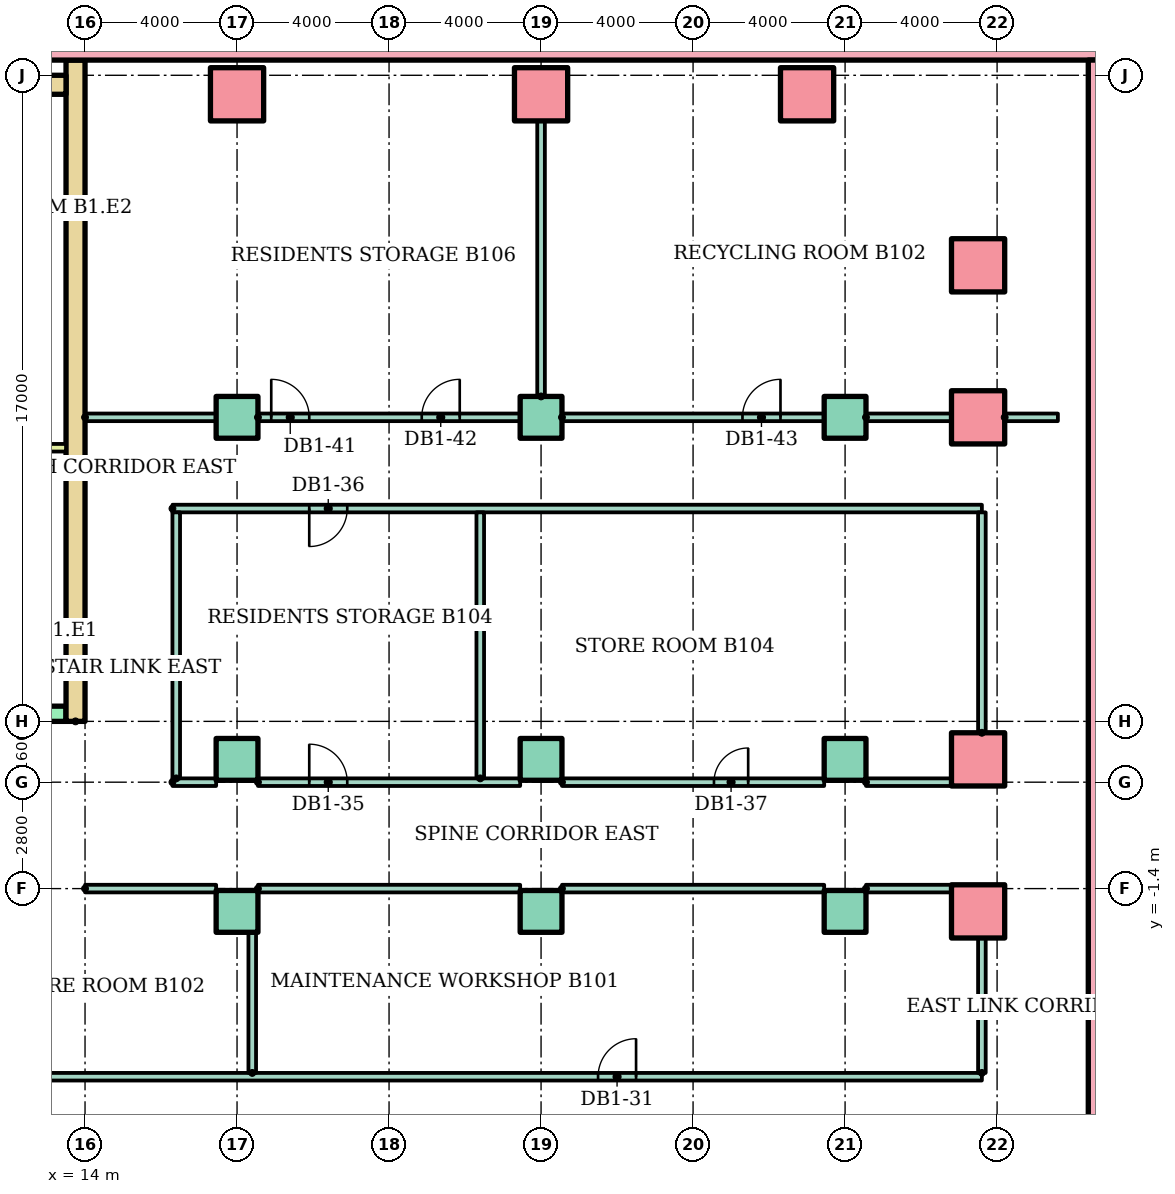
"""IFC4 building model, lengths in metres.
Left out: names, types, materials, properties, quantities, classifications, styles, units other than length and angle.
Written with IfcOpenShell. Run it as: python <this file> out.ifc"""

import sys

from ifc_helpers import new_model, si_unit, direction, frame, frame_2d, origin, origin_2d, place, context, subcontext, project, spatial, rectangle, hollow_rectangle, extrude, element, fill, save


model = new_model("IFC4")
c1 = context("Model", 3, precision=1e-05, world=origin(), true_north=direction((0.0, 1.0)))
c2 = subcontext(c1, "Body", "Model", "MODEL_VIEW")
j1 = project(units=[si_unit("LENGTHUNIT", "METRE"), si_unit("PLANEANGLEUNIT", "RADIAN")], contexts=[c1])
p1 = place(None, origin())
s1 = spatial("IfcSite", under=j1, at=p1, CompositionType="ELEMENT")
p2 = place(p1, origin())
s2 = spatial("IfcBuilding", under=s1, at=p2, CompositionType="ELEMENT")
p3 = place(p2, frame((0.0, 0.0, -5.0)))
s3 = spatial("IfcBuildingStorey", under=s2, at=p3, CompositionType="ELEMENT", Elevation=-5.0)
p4 = place(p3, frame((-41.0, 20.7, -0.35)))
e1 = element("IfcWall", 1, at=p4, inside=s3, PredefinedType="SOLIDWALL", context=c2, shape_type="SweptSolid", body=[
    extrude(rectangle(XDim=82.0, YDim=0.6, at=frame_2d((41.0, 0.0))), origin(), (0.0, 0.0, 1.0), 4.93),
])
p5 = place(p3, frame((40.7, -50.4, -0.35), z_axis=(0.0, 0.0, 1.0), x_axis=(0.0, 1.0, 0.0)))
e2 = element("IfcWall", 2, at=p5, inside=s3, PredefinedType="SOLIDWALL", context=c2, shape_type="SweptSolid", body=[
    extrude(rectangle(XDim=70.8, YDim=0.6, at=frame_2d((35.4, 0.0))), origin(), (0.0, 0.0, 1.0), 4.93),
])
for number, where in (
    (3, (18.0, -2.0, 0.0)),
    (4, (26.0, -2.0, 0.0)),
    (5, (34.0, -2.0, 0.0)),
):
    element("IfcColumn", number, at=place(p3, frame(where)), inside=s3, PredefinedType="COLUMN", context=c2, shape_type="SweptSolid", body=[
        extrude(rectangle(XDim=1.1, YDim=1.1, at=origin_2d()), origin(), (0.0, 0.0, 1.0), 5.0),
    ])
p6 = place(p3, frame((37.5, -2.0, 0.0)))
e6 = element("IfcColumn", 6, at=p6, inside=s3, PredefinedType="COLUMN", context=c2, shape_type="SweptSolid", body=[
    extrude(hollow_rectangle(XDim=1.4, YDim=1.4, WallThickness=0.08, at=origin_2d()), origin(), (0.0, 0.0, 1.0), 5.0),
])
for number, where in (
    (7, (18.0, 2.0, 0.0)),
    (8, (26.0, 2.0, 0.0)),
    (9, (34.0, 2.0, 0.0)),
):
    element("IfcColumn", number, at=place(p3, frame(where)), inside=s3, PredefinedType="COLUMN", context=c2, shape_type="SweptSolid", body=[
        extrude(rectangle(XDim=1.1, YDim=1.1, at=origin_2d()), origin(), (0.0, 0.0, 1.0), 5.0),
    ])
p7 = place(p3, frame((37.5, 2.0, 0.0)))
e10 = element("IfcColumn", 10, at=p7, inside=s3, PredefinedType="COLUMN", context=c2, shape_type="SweptSolid", body=[
    extrude(hollow_rectangle(XDim=1.4, YDim=1.4, WallThickness=0.08, at=origin_2d()), origin(), (0.0, 0.0, 1.0), 5.0),
])
for number, where in (
    (11, (18.0, 11.0, 0.0)),
    (12, (26.0, 11.0, 0.0)),
    (13, (34.0, 11.0, 0.0)),
):
    element("IfcColumn", number, at=place(p3, frame(where)), inside=s3, PredefinedType="COLUMN", context=c2, shape_type="SweptSolid", body=[
        extrude(rectangle(XDim=1.1, YDim=1.1, at=origin_2d()), origin(), (0.0, 0.0, 1.0), 5.0),
    ])
for number, where in (
    (14, (37.5, 11.0, 0.0)),
    (15, (37.5, 15.0, 0.0)),
    (16, (18.0, 19.5, 0.0)),
    (17, (26.0, 19.5, 0.0)),
    (18, (33.0, 19.5, 0.0)),
):
    element("IfcColumn", number, at=place(p3, frame(where)), inside=s3, PredefinedType="COLUMN", context=c2, shape_type="SweptSolid", body=[
        extrude(hollow_rectangle(XDim=1.4, YDim=1.4, WallThickness=0.08, at=origin_2d()), origin(), (0.0, 0.0, 1.0), 5.0),
    ])
p8 = place(p3, frame((13.75, 3.0, 0.0), z_axis=(0.0, 0.0, 1.0), x_axis=(0.0, 1.0, 0.0)))
e19 = element("IfcWall", 19, at=p8, inside=s3, PredefinedType="SHEAR", context=c2, shape_type="SweptSolid", body=[
    extrude(rectangle(XDim=17.4, YDim=0.5, at=frame_2d((8.7, 0.0))), origin(), (0.0, 0.0, 1.0), 4.58),
])
p9 = place(p3, frame((-13.5, 19.75, 0.0)))
e20 = element("IfcWall", 20, at=p9, inside=s3, PredefinedType="SHEAR", context=c2, shape_type="SweptSolid", body=[
    extrude(rectangle(XDim=27.0, YDim=0.5, at=frame_2d((13.5, 0.0))), origin(), (0.0, 0.0, 1.0), 4.58),
])
p10 = place(p3, frame((-13.5, 3.2, 0.0)))
e21 = element("IfcWall", 21, at=p10, inside=s3, PredefinedType="SHEAR", context=c2, shape_type="SweptSolid", body=[
    extrude(rectangle(XDim=27.0, YDim=0.4, at=frame_2d((13.5, 0.0))), origin(), (0.0, 0.0, 1.0), 4.58),
])
p11 = place(p10, frame((6.861, 0.0, 0.0)))
e22 = element("IfcOpeningElement", 22, at=p11, cuts=e21, PredefinedType="OPENING", context=c2, shape_type="SweptSolid", body=[
    extrude(rectangle(XDim=1.1, YDim=2.1, at=frame_2d((0.55, 1.05))), frame((0.0, 0.21, 0.0), z_axis=(0.0, -1.0, 0.0), x_axis=(1.0, 0.0, 0.0)), (0.0, 0.0, 1.0), 0.42),
])
p12 = place(p10, frame((9.906, 0.0, 0.0)))
e23 = element("IfcOpeningElement", 23, at=p12, cuts=e21, PredefinedType="OPENING", context=c2, shape_type="SweptSolid", body=[
    extrude(rectangle(XDim=1.1, YDim=2.1, at=frame_2d((0.55, 1.05))), frame((0.0, 0.21, 0.0), z_axis=(0.0, -1.0, 0.0), x_axis=(1.0, 0.0, 0.0)), (0.0, 0.0, 1.0), 0.42),
])
p13 = place(p10, frame((15.994, 0.0, 0.0)))
e24 = element("IfcOpeningElement", 24, at=p13, cuts=e21, PredefinedType="OPENING", context=c2, shape_type="SweptSolid", body=[
    extrude(rectangle(XDim=1.1, YDim=2.1, at=frame_2d((0.55, 1.05))), frame((0.0, 0.21, 0.0), z_axis=(0.0, -1.0, 0.0), x_axis=(1.0, 0.0, 0.0)), (0.0, 0.0, 1.0), 0.42),
])
p14 = place(p10, frame((19.039, 0.0, 0.0)))
e25 = element("IfcOpeningElement", 25, at=p14, cuts=e21, PredefinedType="OPENING", context=c2, shape_type="SweptSolid", body=[
    extrude(rectangle(XDim=1.1, YDim=2.1, at=frame_2d((0.55, 1.05))), frame((0.0, 0.21, 0.0), z_axis=(0.0, -1.0, 0.0), x_axis=(1.0, 0.0, 0.0)), (0.0, 0.0, 1.0), 0.42),
])
p15 = place(p10, frame((12.6, 0.0, 0.0)))
e26 = element("IfcOpeningElement", 26, at=p15, cuts=e21, PredefinedType="OPENING", context=c2, shape_type="SweptSolid", body=[
    extrude(rectangle(XDim=1.8, YDim=2.1, at=frame_2d((0.9, 1.05))), frame((0.0, 0.21, 0.0), z_axis=(0.0, -1.0, 0.0), x_axis=(1.0, 0.0, 0.0)), (0.0, 0.0, 1.0), 0.42),
])
p16 = place(p3, frame((9.6, 10.2, 0.0)))
e27 = element("IfcWall", 27, at=p16, inside=s3, PredefinedType="PARTITIONING", context=c2, shape_type="SweptSolid", body=[
    extrude(rectangle(XDim=3.9, YDim=0.2, at=frame_2d((1.95, 0.0))), origin(), (0.0, 0.0, 1.0), 4.58),
])
p17 = place(p3, frame((-37.6, -6.35, 0.0)))
e28 = element("IfcWall", 28, at=p17, inside=s3, PredefinedType="PARTITIONING", context=c2, shape_type="SweptSolid", body=[
    extrude(rectangle(XDim=75.2, YDim=0.2, at=frame_2d((37.6, 0.0))), origin(), (0.0, 0.0, 1.0), 4.58),
])
p18 = place(p17, frame((4.5, 0.0, 0.0)))
e29 = element("IfcOpeningElement", 29, at=p18, cuts=e28, PredefinedType="OPENING", context=c2, shape_type="SweptSolid", body=[
    extrude(rectangle(XDim=1.0, YDim=2.1, at=frame_2d((0.5, 1.05))), frame((0.0, 0.11, 0.0), z_axis=(0.0, -1.0, 0.0), x_axis=(1.0, 0.0, 0.0)), (0.0, 0.0, 1.0), 0.22),
])
p19 = place(p17, frame((15.3, 0.0, 0.0)))
e30 = element("IfcOpeningElement", 30, at=p19, cuts=e28, PredefinedType="OPENING", context=c2, shape_type="SweptSolid", body=[
    extrude(rectangle(XDim=1.4, YDim=2.1, at=frame_2d((0.7, 1.05))), frame((0.0, 0.11, 0.0), z_axis=(0.0, -1.0, 0.0), x_axis=(1.0, 0.0, 0.0)), (0.0, 0.0, 1.0), 0.22),
])
p20 = place(p17, frame((26.5, 0.0, 0.0)))
e31 = element("IfcOpeningElement", 31, at=p20, cuts=e28, PredefinedType="OPENING", context=c2, shape_type="SweptSolid", body=[
    extrude(rectangle(XDim=1.0, YDim=2.1, at=frame_2d((0.5, 1.05))), frame((0.0, 0.11, 0.0), z_axis=(0.0, -1.0, 0.0), x_axis=(1.0, 0.0, 0.0)), (0.0, 0.0, 1.0), 0.22),
])
p21 = place(p17, frame((36.55, 0.0, 0.0)))
e32 = element("IfcOpeningElement", 32, at=p21, cuts=e28, PredefinedType="OPENING", context=c2, shape_type="SweptSolid", body=[
    extrude(rectangle(XDim=0.9, YDim=2.1, at=frame_2d((0.45, 1.05))), frame((0.0, 0.11, 0.0), z_axis=(0.0, -1.0, 0.0), x_axis=(1.0, 0.0, 0.0)), (0.0, 0.0, 1.0), 0.22),
])
p22 = place(p17, frame((48.55, 0.0, 0.0)))
e33 = element("IfcOpeningElement", 33, at=p22, cuts=e28, PredefinedType="OPENING", context=c2, shape_type="SweptSolid", body=[
    extrude(rectangle(XDim=0.9, YDim=2.1, at=frame_2d((0.45, 1.05))), frame((0.0, 0.11, 0.0), z_axis=(0.0, -1.0, 0.0), x_axis=(1.0, 0.0, 0.0)), (0.0, 0.0, 1.0), 0.22),
])
p23 = place(p17, frame((65.1, 0.0, 0.0)))
e34 = element("IfcOpeningElement", 34, at=p23, cuts=e28, PredefinedType="OPENING", context=c2, shape_type="SweptSolid", body=[
    extrude(rectangle(XDim=1.0, YDim=2.1, at=frame_2d((0.5, 1.05))), frame((0.0, 0.11, 0.0), z_axis=(0.0, -1.0, 0.0), x_axis=(1.0, 0.0, 0.0)), (0.0, 0.0, 1.0), 0.22),
])
p24 = place(p3, frame((14.0, -1.4, 0.0)))
e35 = element("IfcWall", 35, at=p24, inside=s3, PredefinedType="PARTITIONING", context=c2, shape_type="SweptSolid", body=[
    extrude(rectangle(XDim=3.45, YDim=0.2, at=frame_2d((1.725, 0.0))), origin(), (0.0, 0.0, 1.0), 4.58),
])
for number, where in (
    (36, (18.55, -1.4, 0.0)),
    (37, (26.55, -1.4, 0.0)),
):
    element("IfcWall", number, at=place(p3, frame(where)), inside=s3, PredefinedType="PARTITIONING", context=c2, shape_type="SweptSolid", body=[
        extrude(rectangle(XDim=6.9, YDim=0.2, at=frame_2d((3.45, 0.0))), origin(), (0.0, 0.0, 1.0), 4.58),
    ])
p25 = place(p3, frame((34.55, -1.4, 0.0)))
e38 = element("IfcWall", 38, at=p25, inside=s3, PredefinedType="PARTITIONING", context=c2, shape_type="SweptSolid", body=[
    extrude(rectangle(XDim=2.25, YDim=0.2, at=frame_2d((1.125, 0.0))), origin(), (0.0, 0.0, 1.0), 4.58),
])
p26 = place(p3, frame((16.3, 1.4, 0.0)))
e39 = element("IfcWall", 39, at=p26, inside=s3, PredefinedType="PARTITIONING", context=c2, shape_type="SweptSolid", body=[
    extrude(rectangle(XDim=1.15, YDim=0.2, at=frame_2d((0.575, 0.0))), origin(), (0.0, 0.0, 1.0), 4.58),
])
p27 = place(p3, frame((18.55, 1.4, 0.0)))
e40 = element("IfcWall", 40, at=p27, inside=s3, PredefinedType="PARTITIONING", context=c2, shape_type="SweptSolid", body=[
    extrude(rectangle(XDim=6.9, YDim=0.2, at=frame_2d((3.45, 0.0))), origin(), (0.0, 0.0, 1.0), 4.58),
])
p28 = place(p27, frame((1.35, 0.0, 0.0)))
e41 = element("IfcOpeningElement", 41, at=p28, cuts=e40, PredefinedType="OPENING", context=c2, shape_type="SweptSolid", body=[
    extrude(rectangle(XDim=1.0, YDim=2.1, at=frame_2d((0.5, 1.05))), frame((0.0, 0.11, 0.0), z_axis=(0.0, -1.0, 0.0), x_axis=(1.0, 0.0, 0.0)), (0.0, 0.0, 1.0), 0.22),
])
p29 = place(p3, frame((26.55, 1.4, 0.0)))
e42 = element("IfcWall", 42, at=p29, inside=s3, PredefinedType="PARTITIONING", context=c2, shape_type="SweptSolid", body=[
    extrude(rectangle(XDim=6.9, YDim=0.2, at=frame_2d((3.45, 0.0))), origin(), (0.0, 0.0, 1.0), 4.58),
])
p30 = place(p29, frame((4.0, 0.0, 0.0)))
e43 = element("IfcOpeningElement", 43, at=p30, cuts=e42, PredefinedType="OPENING", context=c2, shape_type="SweptSolid", body=[
    extrude(rectangle(XDim=0.9, YDim=2.1, at=frame_2d((0.45, 1.05))), frame((0.0, 0.11, 0.0), z_axis=(0.0, -1.0, 0.0), x_axis=(1.0, 0.0, 0.0)), (0.0, 0.0, 1.0), 0.22),
])
p31 = place(p3, frame((34.55, 1.4, 0.0)))
e44 = element("IfcWall", 44, at=p31, inside=s3, PredefinedType="PARTITIONING", context=c2, shape_type="SweptSolid", body=[
    extrude(rectangle(XDim=2.25, YDim=0.2, at=frame_2d((1.125, 0.0))), origin(), (0.0, 0.0, 1.0), 4.58),
])
p32 = place(p3, frame((16.3, 8.6, 0.0)))
e45 = element("IfcWall", 45, at=p32, inside=s3, PredefinedType="PARTITIONING", context=c2, shape_type="SweptSolid", body=[
    extrude(rectangle(XDim=21.3, YDim=0.2, at=frame_2d((10.65, 0.0))), origin(), (0.0, 0.0, 1.0), 4.58),
])
p33 = place(p32, frame((3.6, 0.0, 0.0)))
e46 = element("IfcOpeningElement", 46, at=p33, cuts=e45, PredefinedType="OPENING", context=c2, shape_type="SweptSolid", body=[
    extrude(rectangle(XDim=1.0, YDim=2.1, at=frame_2d((0.5, 1.05))), frame((0.0, 0.11, 0.0), z_axis=(0.0, -1.0, 0.0), x_axis=(1.0, 0.0, 0.0)), (0.0, 0.0, 1.0), 0.22),
])
p34 = place(p3, frame((14.0, 11.0, 0.0)))
e47 = element("IfcWall", 47, at=p34, inside=s3, PredefinedType="PARTITIONING", context=c2, shape_type="SweptSolid", body=[
    extrude(rectangle(XDim=3.45, YDim=0.2, at=frame_2d((1.725, 0.0))), origin(), (0.0, 0.0, 1.0), 4.58),
])
p35 = place(p3, frame((18.55, 11.0, 0.0)))
e48 = element("IfcWall", 48, at=p35, inside=s3, PredefinedType="PARTITIONING", context=c2, shape_type="SweptSolid", body=[
    extrude(rectangle(XDim=6.9, YDim=0.2, at=frame_2d((3.45, 0.0))), origin(), (0.0, 0.0, 1.0), 4.58),
])
p36 = place(p35, frame((0.35, 0.0, 0.0)))
e49 = element("IfcOpeningElement", 49, at=p36, cuts=e48, PredefinedType="OPENING", context=c2, shape_type="SweptSolid", body=[
    extrude(rectangle(XDim=1.0, YDim=2.1, at=frame_2d((0.5, 1.05))), frame((0.0, 0.11, 0.0), z_axis=(0.0, -1.0, 0.0), x_axis=(1.0, 0.0, 0.0)), (0.0, 0.0, 1.0), 0.22),
])
p37 = place(p35, frame((4.31, 0.0, 0.0)))
e50 = element("IfcOpeningElement", 50, at=p37, cuts=e48, PredefinedType="OPENING", context=c2, shape_type="SweptSolid", body=[
    extrude(rectangle(XDim=1.0, YDim=2.1, at=frame_2d((0.5, 1.05))), frame((0.0, 0.11, 0.0), z_axis=(0.0, -1.0, 0.0), x_axis=(1.0, 0.0, 0.0)), (0.0, 0.0, 1.0), 0.22),
])
p38 = place(p3, frame((26.55, 11.0, 0.0)))
e51 = element("IfcWall", 51, at=p38, inside=s3, PredefinedType="PARTITIONING", context=c2, shape_type="SweptSolid", body=[
    extrude(rectangle(XDim=6.9, YDim=0.2, at=frame_2d((3.45, 0.0))), origin(), (0.0, 0.0, 1.0), 4.58),
])
p39 = place(p38, frame((4.75, 0.0, 0.0)))
e52 = element("IfcOpeningElement", 52, at=p39, cuts=e51, PredefinedType="OPENING", context=c2, shape_type="SweptSolid", body=[
    extrude(rectangle(XDim=1.0, YDim=2.1, at=frame_2d((0.5, 1.05))), frame((0.0, 0.11, 0.0), z_axis=(0.0, -1.0, 0.0), x_axis=(1.0, 0.0, 0.0)), (0.0, 0.0, 1.0), 0.22),
])
p40 = place(p3, frame((34.55, 11.0, 0.0)))
e53 = element("IfcWall", 53, at=p40, inside=s3, PredefinedType="PARTITIONING", context=c2, shape_type="SweptSolid", body=[
    extrude(rectangle(XDim=2.25, YDim=0.2, at=frame_2d((1.125, 0.0))), origin(), (0.0, 0.0, 1.0), 4.58),
])
p41 = place(p3, frame((38.2, 11.0, 0.0)))
e54 = element("IfcWall", 54, at=p41, inside=s3, PredefinedType="PARTITIONING", context=c2, shape_type="SweptSolid", body=[
    extrude(rectangle(XDim=1.4, YDim=0.2, at=frame_2d((0.7, 0.0))), origin(), (0.0, 0.0, 1.0), 4.58),
])
p42 = place(p3, frame((16.4, 1.5, 0.0), z_axis=(0.0, 0.0, 1.0), x_axis=(0.0, 1.0, 0.0)))
e55 = element("IfcWall", 55, at=p42, inside=s3, PredefinedType="PARTITIONING", context=c2, shape_type="SweptSolid", body=[
    extrude(rectangle(XDim=7.0, YDim=0.2, at=frame_2d((3.5, 0.0))), origin(), (0.0, 0.0, 1.0), 4.58),
])
p43 = place(p3, frame((18.4, -6.25, 0.0), z_axis=(0.0, 0.0, 1.0), x_axis=(0.0, 1.0, 0.0)))
e56 = element("IfcWall", 56, at=p43, inside=s3, PredefinedType="PARTITIONING", context=c2, shape_type="SweptSolid", body=[
    extrude(rectangle(XDim=3.7, YDim=0.2, at=frame_2d((1.85, 0.0))), origin(), (0.0, 0.0, 1.0), 4.58),
])
p44 = place(p3, frame((24.4, 1.5, 0.0), z_axis=(0.0, 0.0, 1.0), x_axis=(0.0, 1.0, 0.0)))
e57 = element("IfcWall", 57, at=p44, inside=s3, PredefinedType="PARTITIONING", context=c2, shape_type="SweptSolid", body=[
    extrude(rectangle(XDim=7.0, YDim=0.2, at=frame_2d((3.5, 0.0))), origin(), (0.0, 0.0, 1.0), 4.58),
])
p45 = place(p3, frame((26.0, 11.55, 0.0), z_axis=(0.0, 0.0, 1.0), x_axis=(0.0, 1.0, 0.0)))
e58 = element("IfcWall", 58, at=p45, inside=s3, PredefinedType="PARTITIONING", context=c2, shape_type="SweptSolid", body=[
    extrude(rectangle(XDim=7.25, YDim=0.2, at=frame_2d((3.625, 0.0))), origin(), (0.0, 0.0, 1.0), 4.58),
])
p46 = place(p3, frame((37.6, -6.25, 0.0), z_axis=(0.0, 0.0, 1.0), x_axis=(0.0, 1.0, 0.0)))
e59 = element("IfcWall", 59, at=p46, inside=s3, PredefinedType="PARTITIONING", context=c2, shape_type="SweptSolid", body=[
    extrude(rectangle(XDim=3.55, YDim=0.2, at=frame_2d((1.775, 0.0))), origin(), (0.0, 0.0, 1.0), 4.58),
])
p47 = place(p3, frame((37.6, 2.7, 0.0), z_axis=(0.0, 0.0, 1.0), x_axis=(0.0, 1.0, 0.0)))
e60 = element("IfcWall", 60, at=p47, inside=s3, PredefinedType="PARTITIONING", context=c2, shape_type="SweptSolid", body=[
    extrude(rectangle(XDim=5.8, YDim=0.2, at=frame_2d((2.9, 0.0))), origin(), (0.0, 0.0, 1.0), 4.58),
])
p48 = place(p23, origin())
e61 = element("IfcDoor", 61, at=p48, inside=s3, OperationType="SINGLE_SWING_RIGHT", PredefinedType="DOOR", context=c2, shape_type="SweptSolid", body=[
    extrude(rectangle(XDim=1.0, YDim=2.1, at=frame_2d((0.5, 1.05))), frame((0.0, 0.025, 0.0), z_axis=(0.0, -1.0, 0.0), x_axis=(1.0, 0.0, 0.0)), (0.0, 0.0, 1.0), 0.05),
])
fill(e34, e61)
p49 = place(p28, origin())
e62 = element("IfcDoor", 62, at=p49, inside=s3, OperationType="SINGLE_SWING_LEFT", PredefinedType="DOOR", context=c2, shape_type="SweptSolid", body=[
    extrude(rectangle(XDim=1.0, YDim=2.1, at=frame_2d((0.5, 1.05))), frame((0.0, 0.025, 0.0), z_axis=(0.0, -1.0, 0.0), x_axis=(1.0, 0.0, 0.0)), (0.0, 0.0, 1.0), 0.05),
])
fill(e41, e62)
p50 = place(p33, frame((1.0, 0.0, 0.0), z_axis=(0.0, 0.0, 1.0), x_axis=(-1.0, 0.0, 0.0)))
e63 = element("IfcDoor", 63, at=p50, inside=s3, OperationType="SINGLE_SWING_LEFT", PredefinedType="DOOR", context=c2, shape_type="SweptSolid", body=[
    extrude(rectangle(XDim=1.0, YDim=2.1, at=frame_2d((0.5, 1.05))), frame((0.0, 0.025, 0.0), z_axis=(0.0, -1.0, 0.0), x_axis=(1.0, 0.0, 0.0)), (0.0, 0.0, 1.0), 0.05),
])
fill(e46, e63)
p51 = place(p30, origin())
e64 = element("IfcDoor", 64, at=p51, inside=s3, OperationType="SINGLE_SWING_RIGHT", PredefinedType="DOOR", context=c2, shape_type="SweptSolid", body=[
    extrude(rectangle(XDim=0.9, YDim=2.1, at=frame_2d((0.45, 1.05))), frame((0.0, 0.025, 0.0), z_axis=(0.0, -1.0, 0.0), x_axis=(1.0, 0.0, 0.0)), (0.0, 0.0, 1.0), 0.05),
])
fill(e43, e64)
p52 = place(p36, origin())
e65 = element("IfcDoor", 65, at=p52, inside=s3, OperationType="SINGLE_SWING_LEFT", PredefinedType="DOOR", context=c2, shape_type="SweptSolid", body=[
    extrude(rectangle(XDim=1.0, YDim=2.1, at=frame_2d((0.5, 1.05))), frame((0.0, 0.025, 0.0), z_axis=(0.0, -1.0, 0.0), x_axis=(1.0, 0.0, 0.0)), (0.0, 0.0, 1.0), 0.05),
])
fill(e49, e65)
p53 = place(p37, origin())
e66 = element("IfcDoor", 66, at=p53, inside=s3, OperationType="SINGLE_SWING_RIGHT", PredefinedType="DOOR", context=c2, shape_type="SweptSolid", body=[
    extrude(rectangle(XDim=1.0, YDim=2.1, at=frame_2d((0.5, 1.05))), frame((0.0, 0.025, 0.0), z_axis=(0.0, -1.0, 0.0), x_axis=(1.0, 0.0, 0.0)), (0.0, 0.0, 1.0), 0.05),
])
fill(e50, e66)
p54 = place(p39, origin())
e67 = element("IfcDoor", 67, at=p54, inside=s3, OperationType="SINGLE_SWING_RIGHT", PredefinedType="DOOR", context=c2, shape_type="SweptSolid", body=[
    extrude(rectangle(XDim=1.0, YDim=2.1, at=frame_2d((0.5, 1.05))), frame((0.0, 0.025, 0.0), z_axis=(0.0, -1.0, 0.0), x_axis=(1.0, 0.0, 0.0)), (0.0, 0.0, 1.0), 0.05),
])
fill(e52, e67)
save(model, sys.argv[1])
